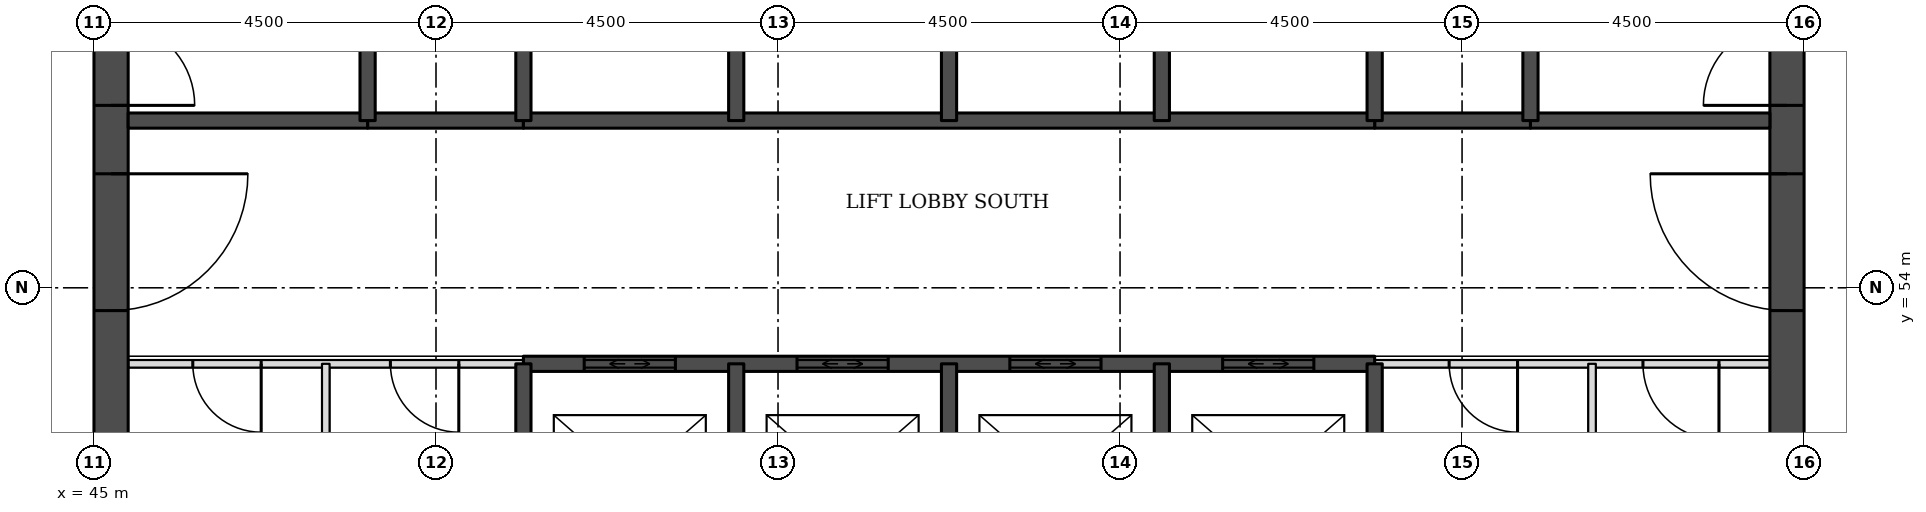
"""IFC4 building model, lengths in metres.
Left out: names, types, materials, properties, quantities, classifications, styles, units other than length and angle.
Written with IfcOpenShell. Run it as: python <this file> out.ifc"""

import sys

from ifc_helpers import new_model, si_unit, direction, frame, frame_2d, origin, place, context, subcontext, project, spatial, rectangle, extrude, element, fill, save


model = new_model("IFC4")
c1 = context("Model", 3, precision=1e-05, world=origin(), true_north=direction((0.0, 1.0)))
c2 = subcontext(c1, "Body", "Model", "MODEL_VIEW")
j1 = project(units=[si_unit("LENGTHUNIT", "METRE"), si_unit("PLANEANGLEUNIT", "RADIAN")], contexts=[c1])
p1 = place(None, origin())
s1 = spatial("IfcSite", under=j1, at=p1, CompositionType="ELEMENT")
p2 = place(p1, origin())
s2 = spatial("IfcBuilding", under=s1, at=p2, CompositionType="ELEMENT")
p3 = place(p2, frame((0.0, 0.0, 130.7)))
s3 = spatial("IfcBuildingStorey", under=s2, at=p3, CompositionType="ELEMENT", Elevation=130.7)
p4 = place(p3, frame((45.225, 49.5, 0.0), z_axis=(0.0, 0.0, 1.0), x_axis=(0.0, 1.0, 0.0)))
e1 = element("IfcWall", 1, at=p4, inside=s3, PredefinedType="SHEAR", context=c2, shape_type="SweptSolid", body=[
    extrude(rectangle(XDim=22.5, YDim=0.45, at=frame_2d((11.25, 0.0))), origin(), (0.0, 0.0, 1.0), 3.7),
])
p5 = place(p4, frame((4.2, 0.0, 0.0)))
e2 = element("IfcOpeningElement", 2, at=p5, cuts=e1, PredefinedType="OPENING", context=c2, shape_type="SweptSolid", body=[
    extrude(rectangle(XDim=1.8, YDim=2.1, at=frame_2d((0.9, 1.05))), frame((0.0, 0.235, 0.0), z_axis=(0.0, -1.0, 0.0), x_axis=(1.0, 0.0, 0.0)), (0.0, 0.0, 1.0), 0.47),
])
p6 = place(p4, frame((6.9, 0.0, 0.0)))
e3 = element("IfcOpeningElement", 3, at=p6, cuts=e1, PredefinedType="OPENING", context=c2, shape_type="SweptSolid", body=[
    extrude(rectangle(XDim=1.1, YDim=2.1, at=frame_2d((0.55, 1.05))), frame((0.0, 0.235, 0.0), z_axis=(0.0, -1.0, 0.0), x_axis=(1.0, 0.0, 0.0)), (0.0, 0.0, 1.0), 0.47),
])
p7 = place(p4, frame((13.6, 0.0, 0.0)))
e4 = element("IfcOpeningElement", 4, at=p7, cuts=e1, PredefinedType="OPENING", context=c2, shape_type="SweptSolid", body=[
    extrude(rectangle(XDim=1.1, YDim=2.1, at=frame_2d((0.55, 1.05))), frame((0.0, 0.235, 0.0), z_axis=(0.0, -1.0, 0.0), x_axis=(1.0, 0.0, 0.0)), (0.0, 0.0, 1.0), 0.47),
])
p8 = place(p4, frame((16.5, 0.0, 0.0)))
e5 = element("IfcOpeningElement", 5, at=p8, cuts=e1, PredefinedType="OPENING", context=c2, shape_type="SweptSolid", body=[
    extrude(rectangle(XDim=1.8, YDim=2.1, at=frame_2d((0.9, 1.05))), frame((0.0, 0.235, 0.0), z_axis=(0.0, -1.0, 0.0), x_axis=(1.0, 0.0, 0.0)), (0.0, 0.0, 1.0), 0.47),
])
p9 = place(p3, frame((67.275, 49.5, 0.0), z_axis=(0.0, 0.0, 1.0), x_axis=(0.0, 1.0, 0.0)))
e6 = element("IfcWall", 6, at=p9, inside=s3, PredefinedType="SHEAR", context=c2, shape_type="SweptSolid", body=[
    extrude(rectangle(XDim=22.5, YDim=0.45, at=frame_2d((11.25, 0.0))), origin(), (0.0, 0.0, 1.0), 3.7),
])
p10 = place(p9, frame((4.2, 0.0, 0.0)))
e7 = element("IfcOpeningElement", 7, at=p10, cuts=e6, PredefinedType="OPENING", context=c2, shape_type="SweptSolid", body=[
    extrude(rectangle(XDim=1.8, YDim=2.1, at=frame_2d((0.9, 1.05))), frame((0.0, 0.235, 0.0), z_axis=(0.0, -1.0, 0.0), x_axis=(1.0, 0.0, 0.0)), (0.0, 0.0, 1.0), 0.47),
])
p11 = place(p9, frame((6.9, 0.0, 0.0)))
e8 = element("IfcOpeningElement", 8, at=p11, cuts=e6, PredefinedType="OPENING", context=c2, shape_type="SweptSolid", body=[
    extrude(rectangle(XDim=1.1, YDim=2.1, at=frame_2d((0.55, 1.05))), frame((0.0, 0.235, 0.0), z_axis=(0.0, -1.0, 0.0), x_axis=(1.0, 0.0, 0.0)), (0.0, 0.0, 1.0), 0.47),
])
p12 = place(p9, frame((13.6, 0.0, 0.0)))
e9 = element("IfcOpeningElement", 9, at=p12, cuts=e6, PredefinedType="OPENING", context=c2, shape_type="SweptSolid", body=[
    extrude(rectangle(XDim=1.1, YDim=2.1, at=frame_2d((0.55, 1.05))), frame((0.0, 0.235, 0.0), z_axis=(0.0, -1.0, 0.0), x_axis=(1.0, 0.0, 0.0)), (0.0, 0.0, 1.0), 0.47),
])
p13 = place(p9, frame((16.5, 0.0, 0.0)))
e10 = element("IfcOpeningElement", 10, at=p13, cuts=e6, PredefinedType="OPENING", context=c2, shape_type="SweptSolid", body=[
    extrude(rectangle(XDim=1.8, YDim=2.1, at=frame_2d((0.9, 1.05))), frame((0.0, 0.235, 0.0), z_axis=(0.0, -1.0, 0.0), x_axis=(1.0, 0.0, 0.0)), (0.0, 0.0, 1.0), 0.47),
])
p14 = place(p3, frame((45.45, 53.0, 0.0), z_axis=(0.0, 0.0, 1.0), x_axis=(1.0, 0.0, 0.0)))
e11 = element("IfcWall", 11, at=p14, inside=s3, PredefinedType="PARTITIONING", context=c2, shape_type="SweptSolid", body=[
    extrude(rectangle(XDim=5.2, YDim=0.1, at=frame_2d((2.6, 0.0))), origin(), (0.0, 0.0, 1.0), 3.55),
])
p15 = place(p14, frame((0.85, 0.0, 0.0)))
e12 = element("IfcOpeningElement", 12, at=p15, cuts=e11, PredefinedType="OPENING", context=c2, shape_type="SweptSolid", body=[
    extrude(rectangle(XDim=0.9, YDim=2.1, at=frame_2d((0.45, 1.05))), frame((0.0, 0.06, 0.0), z_axis=(0.0, -1.0, 0.0), x_axis=(1.0, 0.0, 0.0)), (0.0, 0.0, 1.0), 0.12),
])
p16 = place(p14, frame((3.45, 0.0, 0.0)))
e13 = element("IfcOpeningElement", 13, at=p16, cuts=e11, PredefinedType="OPENING", context=c2, shape_type="SweptSolid", body=[
    extrude(rectangle(XDim=0.9, YDim=2.1, at=frame_2d((0.45, 1.05))), frame((0.0, 0.06, 0.0), z_axis=(0.0, -1.0, 0.0), x_axis=(1.0, 0.0, 0.0)), (0.0, 0.0, 1.0), 0.12),
])
p17 = place(p3, frame((61.85, 53.0, 0.0), z_axis=(0.0, 0.0, 1.0), x_axis=(1.0, 0.0, 0.0)))
e14 = element("IfcWall", 14, at=p17, inside=s3, PredefinedType="PARTITIONING", context=c2, shape_type="SweptSolid", body=[
    extrude(rectangle(XDim=5.2, YDim=0.1, at=frame_2d((2.6, 0.0))), origin(), (0.0, 0.0, 1.0), 3.55),
])
p18 = place(p17, frame((3.53, 0.0, 0.0)))
e15 = element("IfcOpeningElement", 15, at=p18, cuts=e14, PredefinedType="OPENING", context=c2, shape_type="SweptSolid", body=[
    extrude(rectangle(XDim=1.0, YDim=2.1, at=frame_2d((0.5, 1.05))), frame((0.0, 0.06, 0.0), z_axis=(0.0, -1.0, 0.0), x_axis=(1.0, 0.0, 0.0)), (0.0, 0.0, 1.0), 0.12),
])
p19 = place(p17, frame((0.98, 0.0, 0.0)))
e16 = element("IfcOpeningElement", 16, at=p19, cuts=e14, PredefinedType="OPENING", context=c2, shape_type="SweptSolid", body=[
    extrude(rectangle(XDim=0.9, YDim=2.1, at=frame_2d((0.45, 1.05))), frame((0.0, 0.06, 0.0), z_axis=(0.0, -1.0, 0.0), x_axis=(1.0, 0.0, 0.0)), (0.0, 0.0, 1.0), 0.12),
])
p20 = place(p3, frame((50.65, 53.0, 0.0), z_axis=(0.0, 0.0, 1.0), x_axis=(1.0, 0.0, 0.0)))
e17 = element("IfcWall", 17, at=p20, inside=s3, PredefinedType="SOLIDWALL", context=c2, shape_type="SweptSolid", body=[
    extrude(rectangle(XDim=11.2, YDim=0.2, at=frame_2d((5.6, 0.0))), origin(), (0.0, 0.0, 1.0), 3.55),
])
p21 = place(p20, frame((0.8, 0.0, 0.0)))
e18 = element("IfcOpeningElement", 18, at=p21, cuts=e17, PredefinedType="OPENING", context=c2, shape_type="SweptSolid", body=[
    extrude(rectangle(XDim=1.2, YDim=2.1, at=frame_2d((0.6, 1.05))), frame((0.0, 0.11, 0.0), z_axis=(0.0, -1.0, 0.0), x_axis=(1.0, 0.0, 0.0)), (0.0, 0.0, 1.0), 0.22),
])
p22 = place(p20, frame((3.6, 0.0, 0.0)))
e19 = element("IfcOpeningElement", 19, at=p22, cuts=e17, PredefinedType="OPENING", context=c2, shape_type="SweptSolid", body=[
    extrude(rectangle(XDim=1.2, YDim=2.1, at=frame_2d((0.6, 1.05))), frame((0.0, 0.11, 0.0), z_axis=(0.0, -1.0, 0.0), x_axis=(1.0, 0.0, 0.0)), (0.0, 0.0, 1.0), 0.22),
])
p23 = place(p20, frame((6.4, 0.0, 0.0)))
e20 = element("IfcOpeningElement", 20, at=p23, cuts=e17, PredefinedType="OPENING", context=c2, shape_type="SweptSolid", body=[
    extrude(rectangle(XDim=1.2, YDim=2.1, at=frame_2d((0.6, 1.05))), frame((0.0, 0.11, 0.0), z_axis=(0.0, -1.0, 0.0), x_axis=(1.0, 0.0, 0.0)), (0.0, 0.0, 1.0), 0.22),
])
p24 = place(p20, frame((9.2, 0.0, 0.0)))
e21 = element("IfcOpeningElement", 21, at=p24, cuts=e17, PredefinedType="OPENING", context=c2, shape_type="SweptSolid", body=[
    extrude(rectangle(XDim=1.2, YDim=2.1, at=frame_2d((0.6, 1.05))), frame((0.0, 0.11, 0.0), z_axis=(0.0, -1.0, 0.0), x_axis=(1.0, 0.0, 0.0)), (0.0, 0.0, 1.0), 0.22),
])
for number, where, z_axis, x_axis in (
    (22, (48.6, 56.2, 0.0), (0.0, 0.0, 1.0), (1.0, 0.0, 0.0)),
    (23, (61.85, 56.2, 0.0), (0.0, 0.0, 1.0), (1.0, 0.0, 0.0)),
):
    element("IfcWall", number, at=place(p3, frame(where, z_axis=z_axis, x_axis=x_axis)), inside=s3, PredefinedType="SOLIDWALL", context=c2, shape_type="SweptSolid", body=[
        extrude(rectangle(XDim=2.05, YDim=0.2, at=frame_2d((1.025, 0.0))), origin(), (0.0, 0.0, 1.0), 3.55),
    ])
p25 = place(p3, frame((45.45, 56.2, 0.0), z_axis=(0.0, 0.0, 1.0), x_axis=(1.0, 0.0, 0.0)))
e24 = element("IfcWall", 24, at=p25, inside=s3, PredefinedType="SOLIDWALL", context=c2, shape_type="SweptSolid", body=[
    extrude(rectangle(XDim=3.15, YDim=0.2, at=frame_2d((1.575, 0.0))), origin(), (0.0, 0.0, 1.0), 3.55),
])
p26 = place(p3, frame((50.65, 56.2, 0.0), z_axis=(0.0, 0.0, 1.0), x_axis=(1.0, 0.0, 0.0)))
e25 = element("IfcWall", 25, at=p26, inside=s3, PredefinedType="SOLIDWALL", context=c2, shape_type="SweptSolid", body=[
    extrude(rectangle(XDim=11.2, YDim=0.2, at=frame_2d((5.6, 0.0))), origin(), (0.0, 0.0, 1.0), 3.55),
])
p27 = place(p3, frame((63.9, 56.2, 0.0), z_axis=(0.0, 0.0, 1.0), x_axis=(1.0, 0.0, 0.0)))
e26 = element("IfcWall", 26, at=p27, inside=s3, PredefinedType="SOLIDWALL", context=c2, shape_type="SweptSolid", body=[
    extrude(rectangle(XDim=3.15, YDim=0.2, at=frame_2d((1.575, 0.0))), origin(), (0.0, 0.0, 1.0), 3.55),
])
p28 = place(p3, frame((48.05, 49.95, 0.0), z_axis=(0.0, 0.0, 1.0), x_axis=(0.0, 1.0, 0.0)))
e27 = element("IfcWall", 27, at=p28, inside=s3, PredefinedType="PARTITIONING", context=c2, shape_type="SweptSolid", body=[
    extrude(rectangle(XDim=3.05, YDim=0.1, at=frame_2d((1.525, 0.0))), origin(), (0.0, 0.0, 1.0), 3.55),
])
p29 = place(p3, frame((48.6, 56.2, 0.0), z_axis=(0.0, 0.0, 1.0), x_axis=(0.0, 1.0, 0.0)))
e28 = element("IfcWall", 28, at=p29, inside=s3, PredefinedType="SOLIDWALL", context=c2, shape_type="SweptSolid", body=[
    extrude(rectangle(XDim=5.8, YDim=0.2, at=frame_2d((2.9, 0.0))), origin(), (0.0, 0.0, 1.0), 3.55),
])
p30 = place(p3, frame((50.65, 49.95, 0.0), z_axis=(0.0, 0.0, 1.0), x_axis=(0.0, 1.0, 0.0)))
e29 = element("IfcWall", 29, at=p30, inside=s3, PredefinedType="SOLIDWALL", context=c2, shape_type="SweptSolid", body=[
    extrude(rectangle(XDim=3.05, YDim=0.2, at=frame_2d((1.525, 0.0))), origin(), (0.0, 0.0, 1.0), 3.55),
])
p31 = place(p3, frame((50.65, 56.2, 0.0), z_axis=(0.0, 0.0, 1.0), x_axis=(0.0, 1.0, 0.0)))
e30 = element("IfcWall", 30, at=p31, inside=s3, PredefinedType="SOLIDWALL", context=c2, shape_type="SweptSolid", body=[
    extrude(rectangle(XDim=2.8, YDim=0.2, at=frame_2d((1.4, 0.0))), origin(), (0.0, 0.0, 1.0), 3.55),
])
p32 = place(p3, frame((53.45, 49.95, 0.0), z_axis=(0.0, 0.0, 1.0), x_axis=(0.0, 1.0, 0.0)))
e31 = element("IfcWall", 31, at=p32, inside=s3, PredefinedType="SOLIDWALL", context=c2, shape_type="SweptSolid", body=[
    extrude(rectangle(XDim=3.05, YDim=0.2, at=frame_2d((1.525, 0.0))), origin(), (0.0, 0.0, 1.0), 3.55),
])
p33 = place(p3, frame((53.45, 56.2, 0.0), z_axis=(0.0, 0.0, 1.0), x_axis=(0.0, 1.0, 0.0)))
e32 = element("IfcWall", 32, at=p33, inside=s3, PredefinedType="SOLIDWALL", context=c2, shape_type="SweptSolid", body=[
    extrude(rectangle(XDim=2.8, YDim=0.2, at=frame_2d((1.4, 0.0))), origin(), (0.0, 0.0, 1.0), 3.55),
])
p34 = place(p3, frame((56.25, 49.95, 0.0), z_axis=(0.0, 0.0, 1.0), x_axis=(0.0, 1.0, 0.0)))
e33 = element("IfcWall", 33, at=p34, inside=s3, PredefinedType="SOLIDWALL", context=c2, shape_type="SweptSolid", body=[
    extrude(rectangle(XDim=3.05, YDim=0.2, at=frame_2d((1.525, 0.0))), origin(), (0.0, 0.0, 1.0), 3.55),
])
p35 = place(p3, frame((56.25, 56.2, 0.0), z_axis=(0.0, 0.0, 1.0), x_axis=(0.0, 1.0, 0.0)))
e34 = element("IfcWall", 34, at=p35, inside=s3, PredefinedType="SOLIDWALL", context=c2, shape_type="SweptSolid", body=[
    extrude(rectangle(XDim=2.8, YDim=0.2, at=frame_2d((1.4, 0.0))), origin(), (0.0, 0.0, 1.0), 3.55),
])
p36 = place(p3, frame((59.05, 49.95, 0.0), z_axis=(0.0, 0.0, 1.0), x_axis=(0.0, 1.0, 0.0)))
e35 = element("IfcWall", 35, at=p36, inside=s3, PredefinedType="SOLIDWALL", context=c2, shape_type="SweptSolid", body=[
    extrude(rectangle(XDim=3.05, YDim=0.2, at=frame_2d((1.525, 0.0))), origin(), (0.0, 0.0, 1.0), 3.55),
])
p37 = place(p3, frame((59.05, 56.2, 0.0), z_axis=(0.0, 0.0, 1.0), x_axis=(0.0, 1.0, 0.0)))
e36 = element("IfcWall", 36, at=p37, inside=s3, PredefinedType="SOLIDWALL", context=c2, shape_type="SweptSolid", body=[
    extrude(rectangle(XDim=2.8, YDim=0.2, at=frame_2d((1.4, 0.0))), origin(), (0.0, 0.0, 1.0), 3.55),
])
p38 = place(p3, frame((61.85, 49.95, 0.0), z_axis=(0.0, 0.0, 1.0), x_axis=(0.0, 1.0, 0.0)))
e37 = element("IfcWall", 37, at=p38, inside=s3, PredefinedType="SOLIDWALL", context=c2, shape_type="SweptSolid", body=[
    extrude(rectangle(XDim=3.05, YDim=0.2, at=frame_2d((1.525, 0.0))), origin(), (0.0, 0.0, 1.0), 3.55),
])
p39 = place(p3, frame((61.85, 56.2, 0.0), z_axis=(0.0, 0.0, 1.0), x_axis=(0.0, 1.0, 0.0)))
e38 = element("IfcWall", 38, at=p39, inside=s3, PredefinedType="SOLIDWALL", context=c2, shape_type="SweptSolid", body=[
    extrude(rectangle(XDim=2.8, YDim=0.2, at=frame_2d((1.4, 0.0))), origin(), (0.0, 0.0, 1.0), 3.55),
])
p40 = place(p3, frame((63.9, 56.2, 0.0), z_axis=(0.0, 0.0, 1.0), x_axis=(0.0, 1.0, 0.0)))
e39 = element("IfcWall", 39, at=p40, inside=s3, PredefinedType="SOLIDWALL", context=c2, shape_type="SweptSolid", body=[
    extrude(rectangle(XDim=5.8, YDim=0.2, at=frame_2d((2.9, 0.0))), origin(), (0.0, 0.0, 1.0), 3.55),
])
p41 = place(p3, frame((64.71, 49.95, 0.0), z_axis=(0.0, 0.0, 1.0), x_axis=(0.0, 1.0, 0.0)))
e40 = element("IfcWall", 40, at=p41, inside=s3, PredefinedType="PARTITIONING", context=c2, shape_type="SweptSolid", body=[
    extrude(rectangle(XDim=3.05, YDim=0.1, at=frame_2d((1.525, 0.0))), origin(), (0.0, 0.0, 1.0), 3.55),
])
p42 = place(p21, origin())
e41 = element("IfcDoor", 41, at=p42, inside=s3, OperationType="DOUBLE_DOOR_SLIDING", PredefinedType="DOOR", context=c2, shape_type="SweptSolid", body=[
    extrude(rectangle(XDim=1.2, YDim=2.1, at=frame_2d((0.6, 1.05))), frame((0.0, 0.025, 0.0), z_axis=(0.0, -1.0, 0.0), x_axis=(1.0, 0.0, 0.0)), (0.0, 0.0, 1.0), 0.05),
])
fill(e18, e41)
p43 = place(p22, origin())
e42 = element("IfcDoor", 42, at=p43, inside=s3, OperationType="DOUBLE_DOOR_SLIDING", PredefinedType="DOOR", context=c2, shape_type="SweptSolid", body=[
    extrude(rectangle(XDim=1.2, YDim=2.1, at=frame_2d((0.6, 1.05))), frame((0.0, 0.025, 0.0), z_axis=(0.0, -1.0, 0.0), x_axis=(1.0, 0.0, 0.0)), (0.0, 0.0, 1.0), 0.05),
])
fill(e19, e42)
p44 = place(p23, origin())
e43 = element("IfcDoor", 43, at=p44, inside=s3, OperationType="DOUBLE_DOOR_SLIDING", PredefinedType="DOOR", context=c2, shape_type="SweptSolid", body=[
    extrude(rectangle(XDim=1.2, YDim=2.1, at=frame_2d((0.6, 1.05))), frame((0.0, 0.025, 0.0), z_axis=(0.0, -1.0, 0.0), x_axis=(1.0, 0.0, 0.0)), (0.0, 0.0, 1.0), 0.05),
])
fill(e20, e43)
p45 = place(p24, origin())
e44 = element("IfcDoor", 44, at=p45, inside=s3, OperationType="DOUBLE_DOOR_SLIDING", PredefinedType="DOOR", context=c2, shape_type="SweptSolid", body=[
    extrude(rectangle(XDim=1.2, YDim=2.1, at=frame_2d((0.6, 1.05))), frame((0.0, 0.025, 0.0), z_axis=(0.0, -1.0, 0.0), x_axis=(1.0, 0.0, 0.0)), (0.0, 0.0, 1.0), 0.05),
])
fill(e21, e44)
p46 = place(p5, frame((1.8, 0.0, 0.0), z_axis=(0.0, 0.0, 1.0), x_axis=(-1.0, 0.0, 0.0)))
e45 = element("IfcDoor", 45, at=p46, inside=s3, OperationType="SINGLE_SWING_LEFT", PredefinedType="DOOR", context=c2, shape_type="SweptSolid", body=[
    extrude(rectangle(XDim=1.8, YDim=2.1, at=frame_2d((0.9, 1.05))), frame((0.0, 0.025, 0.0), z_axis=(0.0, -1.0, 0.0), x_axis=(1.0, 0.0, 0.0)), (0.0, 0.0, 1.0), 0.05),
])
fill(e2, e45)
p47 = place(p6, frame((1.1, 0.0, 0.0), z_axis=(0.0, 0.0, 1.0), x_axis=(-1.0, 0.0, 0.0)))
e46 = element("IfcDoor", 46, at=p47, inside=s3, OperationType="SINGLE_SWING_RIGHT", PredefinedType="DOOR", context=c2, shape_type="SweptSolid", body=[
    extrude(rectangle(XDim=1.1, YDim=2.1, at=frame_2d((0.55, 1.05))), frame((0.0, 0.025, 0.0), z_axis=(0.0, -1.0, 0.0), x_axis=(1.0, 0.0, 0.0)), (0.0, 0.0, 1.0), 0.05),
])
fill(e3, e46)
p48 = place(p10, origin())
e47 = element("IfcDoor", 47, at=p48, inside=s3, OperationType="SINGLE_SWING_RIGHT", PredefinedType="DOOR", context=c2, shape_type="SweptSolid", body=[
    extrude(rectangle(XDim=1.8, YDim=2.1, at=frame_2d((0.9, 1.05))), frame((0.0, 0.025, 0.0), z_axis=(0.0, -1.0, 0.0), x_axis=(1.0, 0.0, 0.0)), (0.0, 0.0, 1.0), 0.05),
])
fill(e7, e47)
p49 = place(p11, origin())
e48 = element("IfcDoor", 48, at=p49, inside=s3, OperationType="SINGLE_SWING_LEFT", PredefinedType="DOOR", context=c2, shape_type="SweptSolid", body=[
    extrude(rectangle(XDim=1.1, YDim=2.1, at=frame_2d((0.55, 1.05))), frame((0.0, 0.025, 0.0), z_axis=(0.0, -1.0, 0.0), x_axis=(1.0, 0.0, 0.0)), (0.0, 0.0, 1.0), 0.05),
])
fill(e8, e48)
p50 = place(p18, frame((1.0, 0.0, 0.0), z_axis=(0.0, 0.0, 1.0), x_axis=(-1.0, 0.0, 0.0)))
e49 = element("IfcDoor", 49, at=p50, inside=s3, OperationType="SINGLE_SWING_LEFT", PredefinedType="DOOR", context=c2, shape_type="SweptSolid", body=[
    extrude(rectangle(XDim=1.0, YDim=2.1, at=frame_2d((0.5, 1.05))), frame((0.0, 0.025, 0.0), z_axis=(0.0, -1.0, 0.0), x_axis=(1.0, 0.0, 0.0)), (0.0, 0.0, 1.0), 0.05),
])
fill(e15, e49)
p51 = place(p19, frame((0.9, 0.0, 0.0), z_axis=(0.0, 0.0, 1.0), x_axis=(-1.0, 0.0, 0.0)))
e50 = element("IfcDoor", 50, at=p51, inside=s3, OperationType="SINGLE_SWING_LEFT", PredefinedType="DOOR", context=c2, shape_type="SweptSolid", body=[
    extrude(rectangle(XDim=0.9, YDim=2.1, at=frame_2d((0.45, 1.05))), frame((0.0, 0.025, 0.0), z_axis=(0.0, -1.0, 0.0), x_axis=(1.0, 0.0, 0.0)), (0.0, 0.0, 1.0), 0.05),
])
fill(e16, e50)
p52 = place(p15, frame((0.9, 0.0, 0.0), z_axis=(0.0, 0.0, 1.0), x_axis=(-1.0, 0.0, 0.0)))
e51 = element("IfcDoor", 51, at=p52, inside=s3, OperationType="SINGLE_SWING_LEFT", PredefinedType="DOOR", context=c2, shape_type="SweptSolid", body=[
    extrude(rectangle(XDim=0.9, YDim=2.1, at=frame_2d((0.45, 1.05))), frame((0.0, 0.025, 0.0), z_axis=(0.0, -1.0, 0.0), x_axis=(1.0, 0.0, 0.0)), (0.0, 0.0, 1.0), 0.05),
])
fill(e12, e51)
p53 = place(p16, frame((0.9, 0.0, 0.0), z_axis=(0.0, 0.0, 1.0), x_axis=(-1.0, 0.0, 0.0)))
e52 = element("IfcDoor", 52, at=p53, inside=s3, OperationType="SINGLE_SWING_LEFT", PredefinedType="DOOR", context=c2, shape_type="SweptSolid", body=[
    extrude(rectangle(XDim=0.9, YDim=2.1, at=frame_2d((0.45, 1.05))), frame((0.0, 0.025, 0.0), z_axis=(0.0, -1.0, 0.0), x_axis=(1.0, 0.0, 0.0)), (0.0, 0.0, 1.0), 0.05),
])
fill(e13, e52)
save(model, sys.argv[1])
